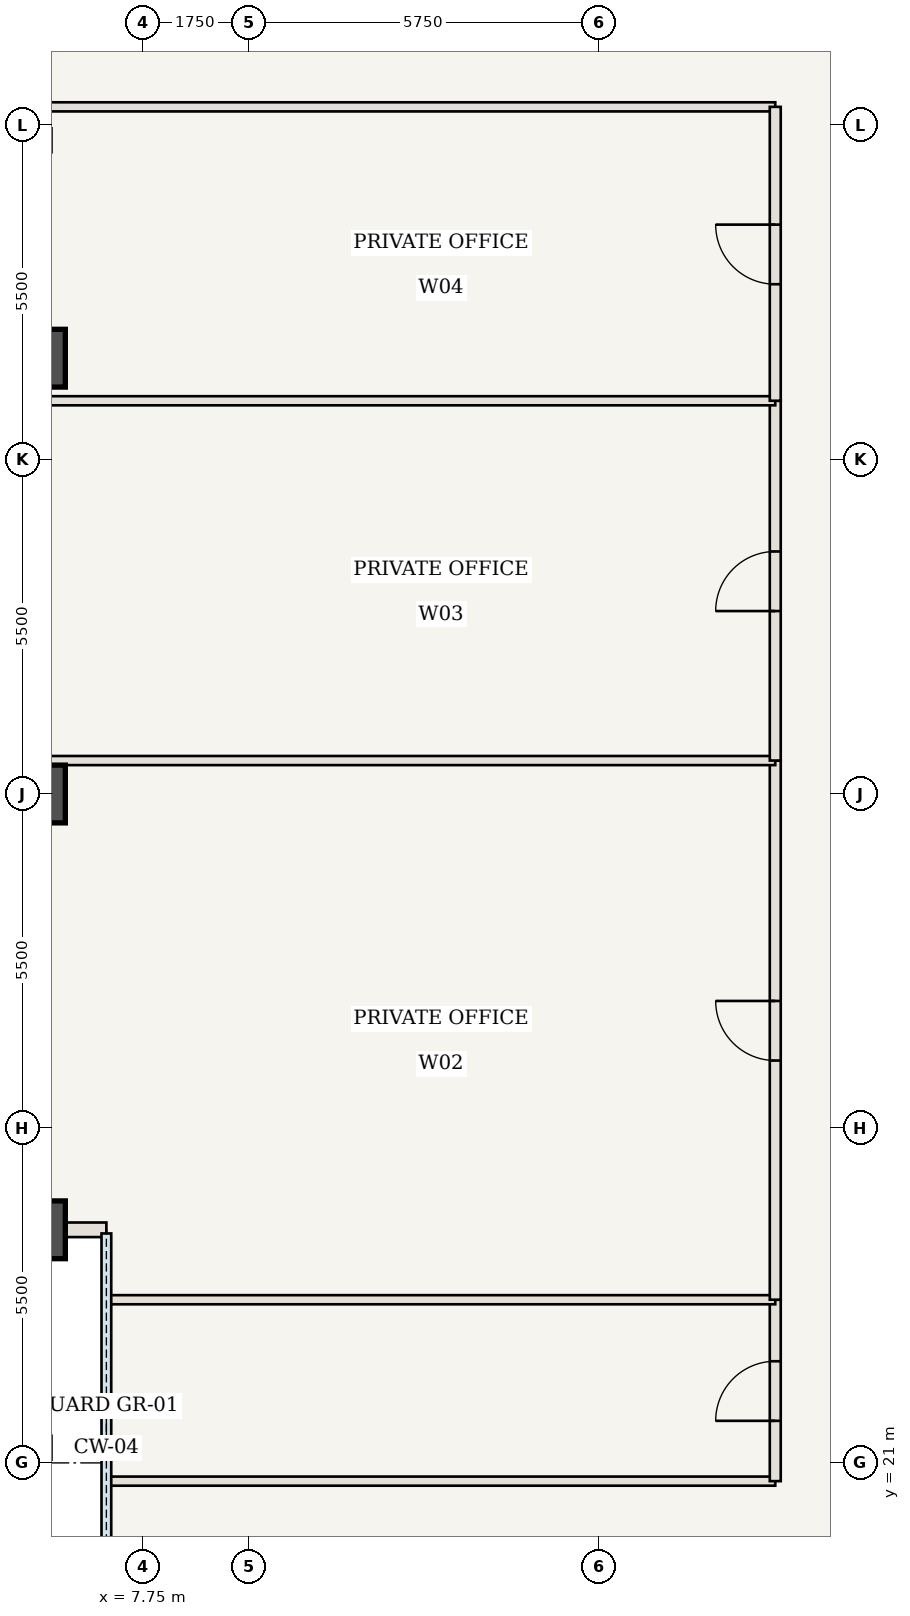
"""IFC4 building model, lengths in metres.
Left out: names, types, materials, properties, quantities, classifications, styles, units other than length and angle.
Written with IfcOpenShell. Run it as: python <this file> out.ifc"""

import sys

from ifc_helpers import new_model, si_unit, direction, frame, frame_2d, origin, origin_2d, place, context, subcontext, project, spatial, rectangle, extrude, element, fill, save


model = new_model("IFC4")
c1 = context("Model", 3, precision=1e-05, world=origin(), true_north=direction((0.0, 1.0)))
c2 = subcontext(c1, "Body", "Model", "MODEL_VIEW")
j1 = project(units=[si_unit("LENGTHUNIT", "METRE"), si_unit("PLANEANGLEUNIT", "RADIAN")], contexts=[c1])
p1 = place(None, origin())
s1 = spatial("IfcSite", under=j1, at=p1, CompositionType="ELEMENT")
p2 = place(p1, origin())
s2 = spatial("IfcBuilding", under=s1, at=p2, CompositionType="ELEMENT")
p3 = place(p2, frame((0.0, 0.0, 168.35)))
s3 = spatial("IfcBuildingStorey", under=s2, at=p3, CompositionType="ELEMENT", Elevation=168.35)
for number, where, z_axis, x_axis in (
    (1, (6.0, 24.833, 0.0), (0.0, 0.0, 1.0), (1.0, 0.0, 0.0)),
    (2, (6.0, 32.0, 0.0), (0.0, 0.0, 1.0), (1.0, 0.0, 0.0)),
    (3, (6.0, 39.167, 0.0), (0.0, 0.0, 1.0), (1.0, 0.0, 0.0)),
):
    element("IfcColumn", number, at=place(p3, frame(where, z_axis=z_axis, x_axis=x_axis)), inside=s3, PredefinedType="COLUMN", context=c2, shape_type="SweptSolid", body=[
        extrude(rectangle(XDim=0.95, YDim=0.95, at=origin_2d()), origin(), (0.0, 0.0, 1.0), 3.85),
    ])
p4 = place(p3, frame((7.16, 20.7, 0.0), z_axis=(0.0, 0.0, 1.0), x_axis=(1.0, 0.0, 0.0)))
e4 = element("IfcWall", 4, at=p4, inside=s3, PredefinedType="STANDARD", context=c2, shape_type="SweptSolid", body=[
    extrude(rectangle(XDim=10.99, YDim=0.15, at=frame_2d((5.495, 0.0))), origin(), (0.0, 0.0, 1.0), 3.065),
])
p5 = place(p3, frame((6.06, 43.3, 0.0), z_axis=(0.0, 0.0, 1.0), x_axis=(1.0, 0.0, 0.0)))
e5 = element("IfcWall", 5, at=p5, inside=s3, PredefinedType="STANDARD", context=c2, shape_type="SweptSolid", body=[
    extrude(rectangle(XDim=12.09, YDim=0.15, at=frame_2d((6.045, 0.0))), origin(), (0.0, 0.0, 1.0), 3.065),
])
p6 = place(p3, frame((18.15, 20.7, 0.0), z_axis=(0.0, 0.0, 1.0), x_axis=(0.0, 1.0, 0.0)))
e6 = element("IfcWall", 6, at=p6, inside=s3, PredefinedType="STANDARD", context=c2, shape_type="SweptSolid", body=[
    extrude(rectangle(XDim=2.983, YDim=0.18, at=frame_2d((1.492, 0.0))), origin(), (0.0, 0.0, 1.0), 3.685),
])
p7 = place(p6, frame((0.992, 0.0, 0.0)))
e7 = element("IfcOpeningElement", 7, at=p7, cuts=e6, PredefinedType="OPENING", context=c2, shape_type="SweptSolid", body=[
    extrude(rectangle(XDim=0.98, YDim=2.2, at=frame_2d((0.49, 1.1))), frame((0.0, 0.1, 0.0), z_axis=(0.0, -1.0, 0.0), x_axis=(1.0, 0.0, 0.0)), (0.0, 0.0, 1.0), 0.2),
])
p8 = place(p3, frame((7.16, 23.683, 0.0), z_axis=(0.0, 0.0, 1.0), x_axis=(1.0, 0.0, 0.0)))
e8 = element("IfcWall", 8, at=p8, inside=s3, PredefinedType="STANDARD", context=c2, shape_type="SweptSolid", body=[
    extrude(rectangle(XDim=10.99, YDim=0.15, at=frame_2d((5.495, 0.0))), origin(), (0.0, 0.0, 1.0), 3.685),
])
p9 = place(p3, frame((18.15, 23.683, 0.0), z_axis=(0.0, 0.0, 1.0), x_axis=(0.0, 1.0, 0.0)))
e9 = element("IfcWall", 9, at=p9, inside=s3, PredefinedType="STANDARD", context=c2, shape_type="SweptSolid", body=[
    extrude(rectangle(XDim=8.867, YDim=0.18, at=frame_2d((4.433, 0.0))), origin(), (0.0, 0.0, 1.0), 3.685),
])
p10 = place(p9, frame((3.933, 0.0, 0.0)))
e10 = element("IfcOpeningElement", 10, at=p10, cuts=e9, PredefinedType="OPENING", context=c2, shape_type="SweptSolid", body=[
    extrude(rectangle(XDim=0.98, YDim=2.2, at=frame_2d((0.49, 1.1))), frame((0.0, 0.1, 0.0), z_axis=(0.0, -1.0, 0.0), x_axis=(1.0, 0.0, 0.0)), (0.0, 0.0, 1.0), 0.2),
])
p11 = place(p3, frame((6.06, 32.55, 0.0), z_axis=(0.0, 0.0, 1.0), x_axis=(1.0, 0.0, 0.0)))
e11 = element("IfcWall", 11, at=p11, inside=s3, PredefinedType="STANDARD", context=c2, shape_type="SweptSolid", body=[
    extrude(rectangle(XDim=12.09, YDim=0.15, at=frame_2d((6.045, 0.0))), origin(), (0.0, 0.0, 1.0), 3.685),
])
p12 = place(p3, frame((18.15, 32.55, 0.0), z_axis=(0.0, 0.0, 1.0), x_axis=(0.0, 1.0, 0.0)))
e12 = element("IfcWall", 12, at=p12, inside=s3, PredefinedType="STANDARD", context=c2, shape_type="SweptSolid", body=[
    extrude(rectangle(XDim=5.917, YDim=0.18, at=frame_2d((2.958, 0.0))), origin(), (0.0, 0.0, 1.0), 3.685),
])
p13 = place(p12, frame((2.458, 0.0, 0.0)))
e13 = element("IfcOpeningElement", 13, at=p13, cuts=e12, PredefinedType="OPENING", context=c2, shape_type="SweptSolid", body=[
    extrude(rectangle(XDim=0.98, YDim=2.2, at=frame_2d((0.49, 1.1))), frame((0.0, 0.1, 0.0), z_axis=(0.0, -1.0, 0.0), x_axis=(1.0, 0.0, 0.0)), (0.0, 0.0, 1.0), 0.2),
])
p14 = place(p3, frame((6.06, 38.467, 0.0), z_axis=(0.0, 0.0, 1.0), x_axis=(1.0, 0.0, 0.0)))
e14 = element("IfcWall", 14, at=p14, inside=s3, PredefinedType="STANDARD", context=c2, shape_type="SweptSolid", body=[
    extrude(rectangle(XDim=12.09, YDim=0.15, at=frame_2d((6.045, 0.0))), origin(), (0.0, 0.0, 1.0), 3.685),
])
p15 = place(p3, frame((18.15, 38.467, 0.0), z_axis=(0.0, 0.0, 1.0), x_axis=(0.0, 1.0, 0.0)))
e15 = element("IfcWall", 15, at=p15, inside=s3, PredefinedType="STANDARD", context=c2, shape_type="SweptSolid", body=[
    extrude(rectangle(XDim=4.833, YDim=0.18, at=frame_2d((2.417, 0.0))), origin(), (0.0, 0.0, 1.0), 3.685),
])
p16 = place(p15, frame((1.917, 0.0, 0.0)))
e16 = element("IfcOpeningElement", 16, at=p16, cuts=e15, PredefinedType="OPENING", context=c2, shape_type="SweptSolid", body=[
    extrude(rectangle(XDim=0.98, YDim=2.2, at=frame_2d((0.49, 1.1))), frame((0.0, 0.1, 0.0), z_axis=(0.0, -1.0, 0.0), x_axis=(1.0, 0.0, 0.0)), (0.0, 0.0, 1.0), 0.2),
])
p17 = place(p3, frame((6.0, 24.833, 0.0), z_axis=(0.0, 0.0, 1.0), x_axis=(1.0, 0.0, 0.0)))
e17 = element("IfcWall", 17, at=p17, inside=s3, PredefinedType="USERDEFINED", context=c2, shape_type="SweptSolid", body=[
    extrude(rectangle(XDim=1.15, YDim=0.24, at=frame_2d((0.575, 0.0))), origin(), (0.0, 0.0, 1.0), 2.885),
])
p18 = place(p7, origin())
e18 = element("IfcDoor", 18, at=p18, inside=s3, OperationType="SINGLE_SWING_LEFT", PredefinedType="DOOR", context=c2, shape_type="SweptSolid", body=[
    extrude(rectangle(XDim=0.98, YDim=2.2, at=frame_2d((0.49, 1.1))), frame((0.0, 0.025, 0.0), z_axis=(0.0, -1.0, 0.0), x_axis=(1.0, 0.0, 0.0)), (0.0, 0.0, 1.0), 0.05),
])
fill(e7, e18)
p19 = place(p10, origin())
e19 = element("IfcDoor", 19, at=p19, inside=s3, OperationType="SINGLE_SWING_RIGHT", PredefinedType="DOOR", context=c2, shape_type="SweptSolid", body=[
    extrude(rectangle(XDim=0.98, YDim=2.2, at=frame_2d((0.49, 1.1))), frame((0.0, 0.025, 0.0), z_axis=(0.0, -1.0, 0.0), x_axis=(1.0, 0.0, 0.0)), (0.0, 0.0, 1.0), 0.05),
])
fill(e10, e19)
p20 = place(p13, origin())
e20 = element("IfcDoor", 20, at=p20, inside=s3, OperationType="SINGLE_SWING_LEFT", PredefinedType="DOOR", context=c2, shape_type="SweptSolid", body=[
    extrude(rectangle(XDim=0.98, YDim=2.2, at=frame_2d((0.49, 1.1))), frame((0.0, 0.025, 0.0), z_axis=(0.0, -1.0, 0.0), x_axis=(1.0, 0.0, 0.0)), (0.0, 0.0, 1.0), 0.05),
])
fill(e13, e20)
p21 = place(p16, origin())
e21 = element("IfcDoor", 21, at=p21, inside=s3, OperationType="SINGLE_SWING_RIGHT", PredefinedType="DOOR", context=c2, shape_type="SweptSolid", body=[
    extrude(rectangle(XDim=0.98, YDim=2.2, at=frame_2d((0.49, 1.1))), frame((0.0, 0.025, 0.0), z_axis=(0.0, -1.0, 0.0), x_axis=(1.0, 0.0, 0.0)), (0.0, 0.0, 1.0), 0.05),
])
fill(e16, e21)
save(model, sys.argv[1])
